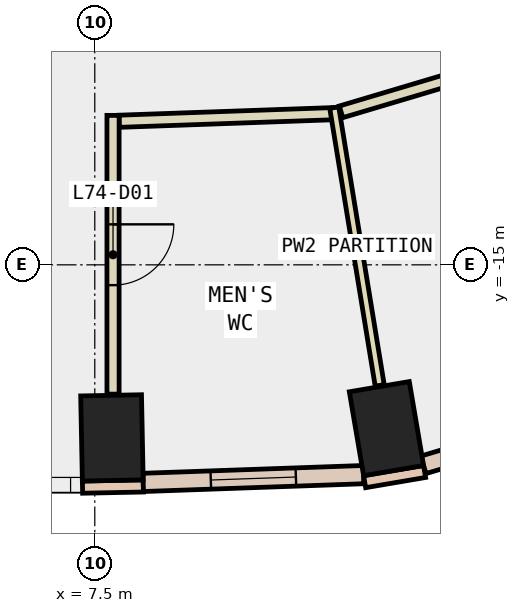
"""IFC4 building model, lengths in metres.
Left out: names, types, materials, properties, quantities, classifications, styles, units other than length and angle.
Written with IfcOpenShell. Run it as: python <this file> out.ifc"""

import sys

from ifc_helpers import new_model, si_unit, direction, frame, frame_2d, origin, origin_2d, place, context, subcontext, project, spatial, rectangle, extrude, element, fill, save


model = new_model("IFC4")
c1 = context("Model", 3, precision=1e-05, world=origin(), true_north=direction((0.0, 1.0)))
c2 = subcontext(c1, "Body", "Model", "MODEL_VIEW")
j1 = project(units=[si_unit("LENGTHUNIT", "METRE"), si_unit("PLANEANGLEUNIT", "RADIAN")], contexts=[c1])
p1 = place(None, origin())
s1 = spatial("IfcSite", under=j1, at=p1, CompositionType="ELEMENT")
p2 = place(p1, origin())
s2 = spatial("IfcBuilding", under=s1, at=p2, CompositionType="ELEMENT")
p3 = place(p2, frame((0.0, 0.0, 315.2)))
s3 = spatial("IfcBuildingStorey", under=s2, at=p3, CompositionType="ELEMENT", Elevation=315.2)
for number, where, z_axis, x_axis in (
    (1, (7.782, -17.846, -0.34), (0.0, 0.0, 1.0), (1.0, 0.02, 0.0)),
    (2, (12.297, -17.694, -0.34), (0.0, 0.0, 1.0), (0.986, 0.168, 0.0)),
):
    element("IfcColumn", number, at=place(p3, frame(where, z_axis=z_axis, x_axis=x_axis)), inside=s3, PredefinedType="COLUMN", context=c2, shape_type="SweptSolid", body=[
        extrude(rectangle(XDim=1.0, YDim=1.4, at=origin_2d()), origin(), (0.0, 0.0, 1.0), 3.6),
    ])
for number, where, z_axis, x_axis in (
    (3, (7.298, -18.656, 0.0), (0.0, 0.0, 1.0), (1.0, 0.02, 0.0)),
    (4, (11.938, -18.566, 0.0), (0.0, 0.0, 1.0), (0.986, 0.168, 0.0)),
):
    element("IfcWall", number, at=place(p3, frame(where, z_axis=z_axis, x_axis=x_axis)), inside=s3, PredefinedType="STANDARD", context=c2, shape_type="SweptSolid", body=[
        extrude(rectangle(XDim=1.0, YDim=0.2, at=frame_2d((0.5, 0.0))), origin(), (0.0, 0.0, 1.0), 3.26),
    ])
p4 = place(p3, frame((8.296, -18.578, 0.0), z_axis=(0.0, 0.0, 1.0), x_axis=(0.999377185233, 0.035287981473, 0.0)))
e5 = element("IfcWall", 5, at=p4, inside=s3, PredefinedType="STANDARD", context=c2, shape_type="SweptSolid", body=[
    extrude(rectangle(XDim=3.625, YDim=0.3, at=frame_2d((1.812, 0.0))), origin(), (0.0, 0.0, 1.0), 3.26),
])
p5 = place(p4, frame((1.113, 0.0, 0.9)))
e6 = element("IfcOpeningElement", 6, at=p5, cuts=e5, PredefinedType="OPENING", context=c2, shape_type="SweptSolid", body=[
    extrude(rectangle(XDim=1.4, YDim=2.0, at=frame_2d((0.7, 1.0))), frame((0.0, 0.16, 0.0), z_axis=(0.0, -1.0, 0.0), x_axis=(1.0, 0.0, 0.0)), (0.0, 0.0, 1.0), 0.32),
])
p6 = place(p3, frame((12.904, -18.289, 0.0), z_axis=(0.0, 0.0, 1.0), x_axis=(0.95841929886, 0.285363711031, 0.0)))
e7 = element("IfcWall", 7, at=p6, inside=s3, PredefinedType="STANDARD", context=c2, shape_type="SweptSolid", body=[
    extrude(rectangle(XDim=4.777, YDim=0.3, at=frame_2d((2.388, 0.0))), origin(), (0.0, 0.0, 1.0), 3.26),
])
p7 = place(p6, frame((1.688, 0.0, 0.9)))
e8 = element("IfcOpeningElement", 8, at=p7, cuts=e7, PredefinedType="OPENING", context=c2, shape_type="SweptSolid", body=[
    extrude(rectangle(XDim=1.4, YDim=2.0, at=frame_2d((0.7, 1.0))), frame((0.0, 0.16, 0.0), z_axis=(0.0, -1.0, 0.0), x_axis=(1.0, 0.0, 0.0)), (0.0, 0.0, 1.0), 0.32),
])
p8 = place(p3, frame((11.479, -12.512, 0.0), z_axis=(0.0, 0.0, 1.0), x_axis=(-0.999371508837, -0.035448375484, 0.0)))
e9 = element("IfcWall", 9, at=p8, inside=s3, PredefinedType="PARTITIONING", context=c2, shape_type="SweptSolid", body=[
    extrude(rectangle(XDim=3.581, YDim=0.2, at=frame_2d((1.791, 0.0))), origin(), (0.0, 0.0, 1.0), 3.26),
])
p9 = place(p3, frame((15.004, -11.456, 0.0), z_axis=(0.0, 0.0, 1.0), x_axis=(-0.958459796003, -0.285227662485, 0.0)))
e10 = element("IfcWall", 10, at=p9, inside=s3, PredefinedType="PARTITIONING", context=c2, shape_type="SweptSolid", body=[
    extrude(rectangle(XDim=3.604, YDim=0.2, at=frame_2d((1.802, 0.0))), origin(), (0.0, 0.0, 1.0), 3.26),
])
p10 = place(p3, frame((7.8, -12.542, 0.0), z_axis=(0.0, 0.0, 1.0), x_axis=(0.0, -1.0, 0.0)))
e11 = element("IfcWall", 11, at=p10, inside=s3, PredefinedType="PARTITIONING", context=c2, shape_type="SweptSolid", body=[
    extrude(rectangle(XDim=4.584, YDim=0.2, at=frame_2d((2.292, 0.0))), origin(), (0.0, 0.0, 1.0), 3.26),
])
p11 = place(p10, frame((1.792, 0.0, 0.0)))
e12 = element("IfcOpeningElement", 12, at=p11, cuts=e11, PredefinedType="OPENING", context=c2, shape_type="SweptSolid", body=[
    extrude(rectangle(XDim=1.0, YDim=2.1, at=frame_2d((0.5, 1.05))), frame((0.0, 0.11, 0.0), z_axis=(0.0, -1.0, 0.0), x_axis=(1.0, 0.0, 0.0)), (0.0, 0.0, 1.0), 0.22),
])
p12 = place(p3, frame((11.438, -12.414, 0.0), z_axis=(0.0, 0.0, 1.0), x_axis=(0.161576343941, -0.986860215572, 0.0)))
e13 = element("IfcWall", 13, at=p12, inside=s3, PredefinedType="PARTITIONING", context=c2, shape_type="SweptSolid", body=[
    extrude(rectangle(XDim=4.63, YDim=0.15, at=frame_2d((2.315, 0.0))), origin(), (0.0, 0.0, 1.0), 3.26),
])
p13 = place(p5, origin())
e14 = element("IfcWindow", 14, at=p13, inside=s3, PartitioningType="SINGLE_PANEL", PredefinedType="WINDOW", context=c2, shape_type="SweptSolid", body=[
    extrude(rectangle(XDim=1.4, YDim=2.0, at=frame_2d((0.7, 1.0))), frame((0.0, 0.03, 0.0), z_axis=(0.0, -1.0, 0.0), x_axis=(1.0, 0.0, 0.0)), (0.0, 0.0, 1.0), 0.06),
])
fill(e6, e14)
p14 = place(p11, origin())
e15 = element("IfcDoor", 15, at=p14, inside=s3, OperationType="SINGLE_SWING_LEFT", PredefinedType="DOOR", context=c2, shape_type="SweptSolid", body=[
    extrude(rectangle(XDim=1.0, YDim=2.1, at=frame_2d((0.5, 1.05))), frame((0.0, 0.025, 0.0), z_axis=(0.0, -1.0, 0.0), x_axis=(1.0, 0.0, 0.0)), (0.0, 0.0, 1.0), 0.05),
])
fill(e12, e15)
save(model, sys.argv[1])
